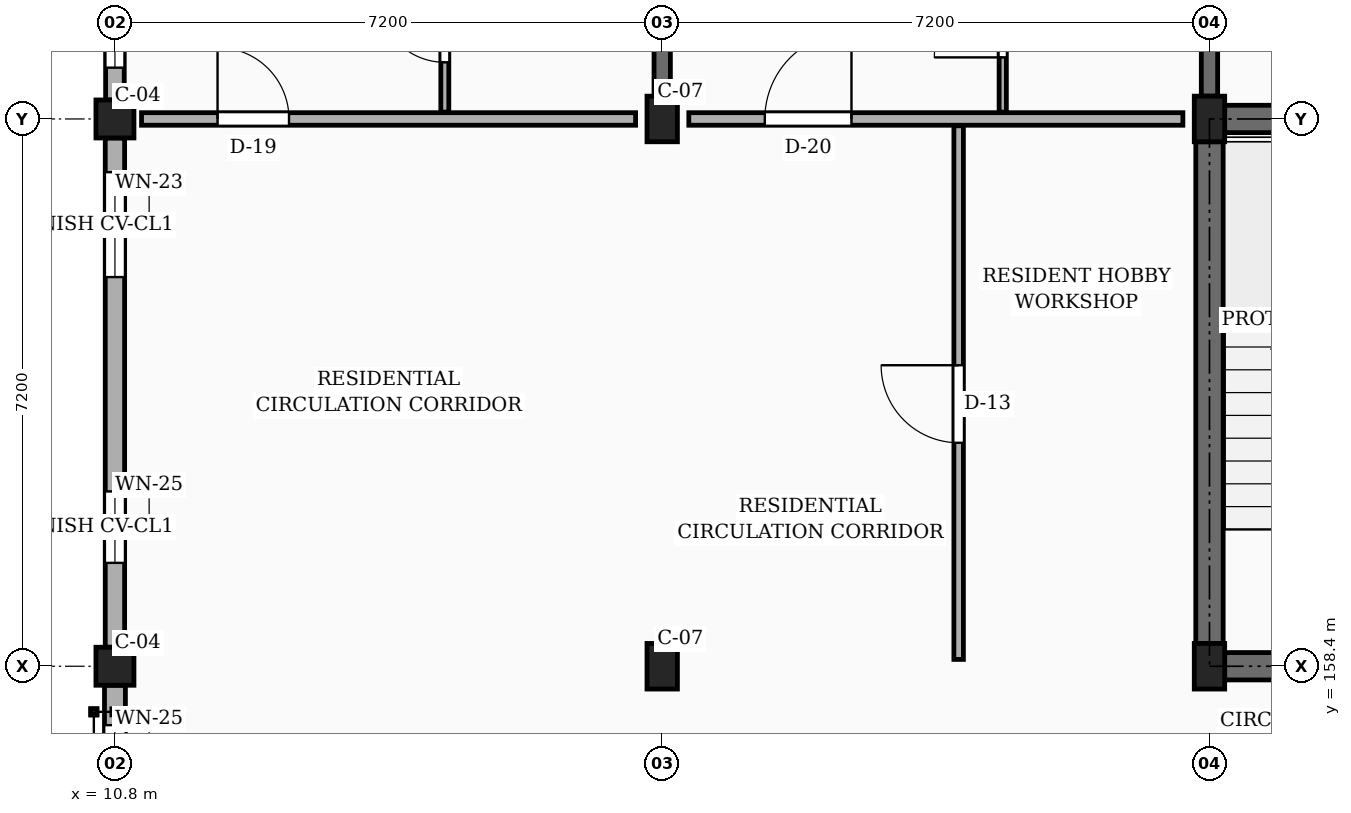
"""IFC4 building model, lengths in metres.
Left out: names, types, materials, properties, quantities, classifications, styles, units other than length and angle.
Written with IfcOpenShell. Run it as: python <this file> out.ifc"""

import sys

from ifc_helpers import new_model, si_unit, direction, frame, frame_2d, origin, origin_2d, place, context, subcontext, project, spatial, rectangle, extrude, element, fill, save


model = new_model("IFC4")
c1 = context("Model", 3, precision=1e-05, world=origin(), true_north=direction((0.0, 1.0)))
c2 = subcontext(c1, "Body", "Model", "MODEL_VIEW")
j1 = project(units=[si_unit("LENGTHUNIT", "METRE"), si_unit("PLANEANGLEUNIT", "RADIAN")], contexts=[c1])
p1 = place(None, origin())
s1 = spatial("IfcSite", under=j1, at=p1, CompositionType="ELEMENT")
p2 = place(p1, origin())
s2 = spatial("IfcBuilding", under=s1, at=p2, CompositionType="ELEMENT")
p3 = place(p2, frame((0.0, 0.0, 32.85)))
s3 = spatial("IfcBuildingStorey", under=s2, at=p3, CompositionType="ELEMENT", Elevation=32.85)
for number, where, z_axis, x_axis in (
    (1, (10.8, 158.4, 0.0), (0.0, 0.0, 1.0), (1.0, 0.0, 0.0)),
    (2, (10.8, 165.6, 0.0), (0.0, 0.0, 1.0), (1.0, 0.0, 0.0)),
):
    element("IfcColumn", number, at=place(p3, frame(where, z_axis=z_axis, x_axis=x_axis)), inside=s3, PredefinedType="COLUMN", context=c2, shape_type="SweptSolid", body=[
        extrude(rectangle(XDim=0.5, YDim=0.5, at=origin_2d()), origin(), (0.0, 0.0, 1.0), 3.15),
    ])
for number, where, z_axis, x_axis in (
    (3, (18.0, 158.4, 0.0), (0.0, 0.0, 1.0), (1.0, 0.0, 0.0)),
    (4, (18.0, 165.6, 0.0), (0.0, 0.0, 1.0), (1.0, 0.0, 0.0)),
    (5, (25.2, 158.4, 0.0), (0.0, 0.0, 1.0), (1.0, 0.0, 0.0)),
    (6, (25.2, 165.6, 0.0), (0.0, 0.0, 1.0), (1.0, 0.0, 0.0)),
):
    element("IfcColumn", number, at=place(p3, frame(where, z_axis=z_axis, x_axis=x_axis)), inside=s3, PredefinedType="COLUMN", context=c2, shape_type="SweptSolid", body=[
        extrude(rectangle(XDim=0.4, YDim=0.6, at=origin_2d()), origin(), (0.0, 0.0, 1.0), 3.15),
    ])
p4 = place(p3, frame((18.0, 165.9, 0.0), z_axis=(0.0, 0.0, 1.0), x_axis=(0.0, 1.0, 0.0)))
e7 = element("IfcWall", 7, at=p4, inside=s3, PredefinedType="SOLIDWALL", context=c2, shape_type="SweptSolid", body=[
    extrude(rectangle(XDim=6.65, YDim=0.215, at=frame_2d((3.325, 0.0))), origin(), (0.0, 0.0, 1.0), 2.185),
])
p5 = place(p3, frame((25.2, 165.9, 0.0), z_axis=(0.0, 0.0, 1.0), x_axis=(0.0, 1.0, 0.0)))
e8 = element("IfcWall", 8, at=p5, inside=s3, PredefinedType="SOLIDWALL", context=c2, shape_type="SweptSolid", body=[
    extrude(rectangle(XDim=6.65, YDim=0.215, at=frame_2d((3.325, 0.0))), origin(), (0.0, 0.0, 1.0), 2.185),
])
p6 = place(p5, frame((4.15, 0.0, 0.0)))
e9 = element("IfcOpeningElement", 9, at=p6, cuts=e8, PredefinedType="OPENING", context=c2, shape_type="SweptSolid", body=[
    extrude(rectangle(XDim=0.98, YDim=2.12, at=frame_2d((0.49, 1.06))), frame((0.0, 0.118, 0.0), z_axis=(0.0, -1.0, 0.0), x_axis=(1.0, 0.0, 0.0)), (0.0, 0.0, 1.0), 0.235),
])
p7 = place(p3, frame((10.8, 172.55, 0.0), z_axis=(0.0, 0.0, 1.0), x_axis=(0.0, -1.0, 0.0)))
e10 = element("IfcWall", 10, at=p7, inside=s3, PredefinedType="SOLIDWALL", context=c2, shape_type="SweptSolid", body=[
    extrude(rectangle(XDim=6.7, YDim=0.245, at=frame_2d((3.35, 0.0))), origin(), (0.0, 0.0, 1.0), 2.455),
])
p8 = place(p7, frame((1.765, 0.0, 0.78)))
e11 = element("IfcOpeningElement", 11, at=p8, cuts=e10, PredefinedType="OPENING", context=c2, shape_type="SweptSolid", body=[
    extrude(rectangle(XDim=1.22, YDim=1.36, at=frame_2d((0.61, 0.68))), frame((0.0, 0.133, 0.0), z_axis=(0.0, -1.0, 0.0), x_axis=(1.0, 0.0, 0.0)), (0.0, 0.0, 1.0), 0.265),
])
p9 = place(p7, frame((4.895, 0.0, 0.78)))
e12 = element("IfcOpeningElement", 12, at=p9, cuts=e10, PredefinedType="OPENING", context=c2, shape_type="SweptSolid", body=[
    extrude(rectangle(XDim=1.38, YDim=1.36, at=frame_2d((0.69, 0.68))), frame((0.0, 0.133, 0.0), z_axis=(0.0, -1.0, 0.0), x_axis=(1.0, 0.0, 0.0)), (0.0, 0.0, 1.0), 0.265),
])
p10 = place(p3, frame((10.8, 165.35, 0.0), z_axis=(0.0, 0.0, 1.0), x_axis=(0.0, -1.0, 0.0)))
e13 = element("IfcWall", 13, at=p10, inside=s3, PredefinedType="SOLIDWALL", context=c2, shape_type="SweptSolid", body=[
    extrude(rectangle(XDim=6.7, YDim=0.255, at=frame_2d((3.35, 0.0))), origin(), (0.0, 0.0, 1.0), 2.455),
])
p11 = place(p10, frame((0.45, 0.0, 0.78)))
e14 = element("IfcOpeningElement", 14, at=p11, cuts=e13, PredefinedType="OPENING", context=c2, shape_type="SweptSolid", body=[
    extrude(rectangle(XDim=1.38, YDim=1.36, at=frame_2d((0.69, 0.68))), frame((0.0, 0.137, 0.0), z_axis=(0.0, -1.0, 0.0), x_axis=(1.0, 0.0, 0.0)), (0.0, 0.0, 1.0), 0.275),
])
p12 = place(p10, frame((4.65, 0.0, 0.78)))
e15 = element("IfcOpeningElement", 15, at=p12, cuts=e13, PredefinedType="OPENING", context=c2, shape_type="SweptSolid", body=[
    extrude(rectangle(XDim=0.94, YDim=1.44, at=frame_2d((0.47, 0.72))), frame((0.0, 0.137, 0.0), z_axis=(0.0, -1.0, 0.0), x_axis=(1.0, 0.0, 0.0)), (0.0, 0.0, 1.0), 0.275),
])
p13 = place(p3, frame((10.8, 158.15, 0.0), z_axis=(0.0, 0.0, 1.0), x_axis=(0.0, -1.0, 0.0)))
e16 = element("IfcWall", 16, at=p13, inside=s3, PredefinedType="SOLIDWALL", context=c2, shape_type="SweptSolid", body=[
    extrude(rectangle(XDim=6.7, YDim=0.275, at=frame_2d((3.35, 0.0))), origin(), (0.0, 0.0, 1.0), 2.455),
])
p14 = place(p13, frame((0.525, 0.0, 0.78)))
e17 = element("IfcOpeningElement", 17, at=p14, cuts=e16, PredefinedType="OPENING", context=c2, shape_type="SweptSolid", body=[
    extrude(rectangle(XDim=0.94, YDim=1.44, at=frame_2d((0.47, 0.72))), frame((0.0, 0.147, 0.0), z_axis=(0.0, -1.0, 0.0), x_axis=(1.0, 0.0, 0.0)), (0.0, 0.0, 1.0), 0.295),
])
p15 = place(p13, frame((2.865, 0.0, 0.78)))
e18 = element("IfcOpeningElement", 18, at=p15, cuts=e16, PredefinedType="OPENING", context=c2, shape_type="SweptSolid", body=[
    extrude(rectangle(XDim=1.15, YDim=1.44, at=frame_2d((0.575, 0.72))), frame((0.0, 0.147, 0.0), z_axis=(0.0, -1.0, 0.0), x_axis=(1.0, 0.0, 0.0)), (0.0, 0.0, 1.0), 0.295),
])
p16 = place(p13, frame((5.355, 0.0, 0.78)))
e19 = element("IfcOpeningElement", 19, at=p16, cuts=e16, PredefinedType="OPENING", context=c2, shape_type="SweptSolid", body=[
    extrude(rectangle(XDim=0.88, YDim=1.26, at=frame_2d((0.44, 0.63))), frame((0.0, 0.147, 0.0), z_axis=(0.0, -1.0, 0.0), x_axis=(1.0, 0.0, 0.0)), (0.0, 0.0, 1.0), 0.295),
])
p17 = place(p3, frame((25.2, 158.7, 0.0), z_axis=(0.0, 0.0, 1.0), x_axis=(0.0, 1.0, 0.0)))
e20 = element("IfcWall", 20, at=p17, inside=s3, PredefinedType="SHEAR", context=c2, shape_type="SweptSolid", body=[
    extrude(rectangle(XDim=6.6, YDim=0.36, at=frame_2d((3.3, 0.0))), origin(), (0.0, 0.0, 1.0), 2.885),
])
p18 = place(p3, frame((25.4, 165.6, 0.0), z_axis=(0.0, 0.0, 1.0), x_axis=(1.0, 0.0, 0.0)))
e21 = element("IfcWall", 21, at=p18, inside=s3, PredefinedType="SHEAR", context=c2, shape_type="SweptSolid", body=[
    extrude(rectangle(XDim=6.8, YDim=0.36, at=frame_2d((3.4, 0.0))), origin(), (0.0, 0.0, 1.0), 2.885),
])
p19 = place(p3, frame((25.4, 158.4, 0.0), z_axis=(0.0, 0.0, 1.0), x_axis=(1.0, 0.0, 0.0)))
e22 = element("IfcWall", 22, at=p19, inside=s3, PredefinedType="SHEAR", context=c2, shape_type="SweptSolid", body=[
    extrude(rectangle(XDim=6.8, YDim=0.36, at=frame_2d((3.4, 0.0))), origin(), (0.0, 0.0, 1.0), 2.885),
])
p20 = place(p19, frame((4.55, 0.0, 0.0)))
e23 = element("IfcOpeningElement", 23, at=p20, cuts=e22, PredefinedType="OPENING", context=c2, shape_type="SweptSolid", body=[
    extrude(rectangle(XDim=1.1, YDim=2.15, at=frame_2d((0.55, 1.075))), frame((0.0, 0.19, 0.0), z_axis=(0.0, -1.0, 0.0), x_axis=(1.0, 0.0, 0.0)), (0.0, 0.0, 1.0), 0.38),
])
p21 = place(p3, frame((11.15, 165.6, 0.0), z_axis=(0.0, 0.0, 1.0), x_axis=(1.0, 0.0, 0.0)))
e24 = element("IfcWall", 24, at=p21, inside=s3, PredefinedType="PARTITIONING", context=c2, shape_type="SweptSolid", body=[
    extrude(rectangle(XDim=6.5, YDim=0.165, at=frame_2d((3.25, 0.0))), origin(), (0.0, 0.0, 1.0), 2.32),
])
p22 = place(p21, frame((1.0, 0.0, 0.0)))
e25 = element("IfcOpeningElement", 25, at=p22, cuts=e24, PredefinedType="OPENING", context=c2, shape_type="SweptSolid", body=[
    extrude(rectangle(XDim=0.94, YDim=2.12, at=frame_2d((0.47, 1.06))), frame((0.0, 0.093, 0.0), z_axis=(0.0, -1.0, 0.0), x_axis=(1.0, 0.0, 0.0)), (0.0, 0.0, 1.0), 0.185),
])
p23 = place(p3, frame((18.35, 165.6, 0.0), z_axis=(0.0, 0.0, 1.0), x_axis=(1.0, 0.0, 0.0)))
e26 = element("IfcWall", 26, at=p23, inside=s3, PredefinedType="PARTITIONING", context=c2, shape_type="SweptSolid", body=[
    extrude(rectangle(XDim=6.5, YDim=0.165, at=frame_2d((3.25, 0.0))), origin(), (0.0, 0.0, 1.0), 2.32),
])
p24 = place(p23, frame((1.0, 0.0, 0.0)))
e27 = element("IfcOpeningElement", 27, at=p24, cuts=e26, PredefinedType="OPENING", context=c2, shape_type="SweptSolid", body=[
    extrude(rectangle(XDim=1.14, YDim=2.18, at=frame_2d((0.57, 1.09))), frame((0.0, 0.093, 0.0), z_axis=(0.0, -1.0, 0.0), x_axis=(1.0, 0.0, 0.0)), (0.0, 0.0, 1.0), 0.185),
])
p25 = place(p3, frame((15.14, 165.69, 0.0), z_axis=(0.0, 0.0, 1.0), x_axis=(0.0, 1.0, 0.0)))
e28 = element("IfcWall", 28, at=p25, inside=s3, PredefinedType="PARTITIONING", context=c2, shape_type="SweptSolid", body=[
    extrude(rectangle(XDim=2.18, YDim=0.105, at=frame_2d((1.09, 0.0))), origin(), (0.0, 0.0, 1.0), 2.32),
])
p26 = place(p25, frame((0.655, 0.0, 0.0)))
e29 = element("IfcOpeningElement", 29, at=p26, cuts=e28, PredefinedType="OPENING", context=c2, shape_type="SweptSolid", body=[
    extrude(rectangle(XDim=0.87, YDim=2.05, at=frame_2d((0.435, 1.025))), frame((0.0, 0.062, 0.0), z_axis=(0.0, -1.0, 0.0), x_axis=(1.0, 0.0, 0.0)), (0.0, 0.0, 1.0), 0.125),
])
p27 = place(p3, frame((21.9, 158.49, 0.0), z_axis=(0.0, 0.0, 1.0), x_axis=(0.0, 1.0, 0.0)))
e30 = element("IfcWall", 30, at=p27, inside=s3, PredefinedType="PARTITIONING", context=c2, shape_type="SweptSolid", body=[
    extrude(rectangle(XDim=7.02, YDim=0.125, at=frame_2d((3.51, 0.0))), origin(), (0.0, 0.0, 1.0), 2.32),
])
p28 = place(p27, frame((2.85, 0.0, 0.0)))
e31 = element("IfcOpeningElement", 31, at=p28, cuts=e30, PredefinedType="OPENING", context=c2, shape_type="SweptSolid", body=[
    extrude(rectangle(XDim=1.02, YDim=2.15, at=frame_2d((0.51, 1.075))), frame((0.0, 0.073, 0.0), z_axis=(0.0, -1.0, 0.0), x_axis=(1.0, 0.0, 0.0)), (0.0, 0.0, 1.0), 0.145),
])
p29 = place(p3, frame((22.48, 165.69, 0.0), z_axis=(0.0, 0.0, 1.0), x_axis=(0.0, 1.0, 0.0)))
e32 = element("IfcWall", 32, at=p29, inside=s3, PredefinedType="PARTITIONING", context=c2, shape_type="SweptSolid", body=[
    extrude(rectangle(XDim=2.34, YDim=0.095, at=frame_2d((1.17, 0.0))), origin(), (0.0, 0.0, 1.0), 2.32),
])
p30 = place(p29, frame((0.72, 0.0, 0.0)))
e33 = element("IfcOpeningElement", 33, at=p30, cuts=e32, PredefinedType="OPENING", context=c2, shape_type="SweptSolid", body=[
    extrude(rectangle(XDim=0.9, YDim=2.05, at=frame_2d((0.45, 1.025))), frame((0.0, 0.058, 0.0), z_axis=(0.0, -1.0, 0.0), x_axis=(1.0, 0.0, 0.0)), (0.0, 0.0, 1.0), 0.115),
])
p31 = place(p9, origin())
e34 = element("IfcWindow", 34, at=p31, inside=s3, PartitioningType="SINGLE_PANEL", PredefinedType="WINDOW", context=c2, shape_type="SweptSolid", body=[
    extrude(rectangle(XDim=1.38, YDim=1.36, at=frame_2d((0.69, 0.68))), frame((0.0, 0.03, 0.0), z_axis=(0.0, -1.0, 0.0), x_axis=(1.0, 0.0, 0.0)), (0.0, 0.0, 1.0), 0.06),
])
fill(e12, e34)
p32 = place(p11, origin())
e35 = element("IfcWindow", 35, at=p32, inside=s3, PartitioningType="SINGLE_PANEL", PredefinedType="WINDOW", context=c2, shape_type="SweptSolid", body=[
    extrude(rectangle(XDim=1.38, YDim=1.36, at=frame_2d((0.69, 0.68))), frame((0.0, 0.03, 0.0), z_axis=(0.0, -1.0, 0.0), x_axis=(1.0, 0.0, 0.0)), (0.0, 0.0, 1.0), 0.06),
])
fill(e14, e35)
p33 = place(p12, origin())
e36 = element("IfcWindow", 36, at=p33, inside=s3, PartitioningType="SINGLE_PANEL", PredefinedType="WINDOW", context=c2, shape_type="SweptSolid", body=[
    extrude(rectangle(XDim=0.94, YDim=1.44, at=frame_2d((0.47, 0.72))), frame((0.0, 0.03, 0.0), z_axis=(0.0, -1.0, 0.0), x_axis=(1.0, 0.0, 0.0)), (0.0, 0.0, 1.0), 0.06),
])
fill(e15, e36)
p34 = place(p14, origin())
e37 = element("IfcWindow", 37, at=p34, inside=s3, PartitioningType="SINGLE_PANEL", PredefinedType="WINDOW", context=c2, shape_type="SweptSolid", body=[
    extrude(rectangle(XDim=0.94, YDim=1.44, at=frame_2d((0.47, 0.72))), frame((0.0, 0.03, 0.0), z_axis=(0.0, -1.0, 0.0), x_axis=(1.0, 0.0, 0.0)), (0.0, 0.0, 1.0), 0.06),
])
fill(e17, e37)
p35 = place(p22, origin())
e38 = element("IfcDoor", 38, at=p35, inside=s3, OperationType="SINGLE_SWING_LEFT", PredefinedType="DOOR", context=c2, shape_type="SweptSolid", body=[
    extrude(rectangle(XDim=0.94, YDim=2.12, at=frame_2d((0.47, 1.06))), frame((0.0, 0.025, 0.0), z_axis=(0.0, -1.0, 0.0), x_axis=(1.0, 0.0, 0.0)), (0.0, 0.0, 1.0), 0.05),
])
fill(e25, e38)
p36 = place(p24, origin())
e39 = element("IfcDoor", 39, at=p36, inside=s3, OperationType="SINGLE_SWING_RIGHT", PredefinedType="DOOR", context=c2, shape_type="SweptSolid", body=[
    extrude(rectangle(XDim=1.14, YDim=2.18, at=frame_2d((0.57, 1.09))), frame((0.0, 0.025, 0.0), z_axis=(0.0, -1.0, 0.0), x_axis=(1.0, 0.0, 0.0)), (0.0, 0.0, 1.0), 0.05),
])
fill(e27, e39)
p37 = place(p26, origin())
e40 = element("IfcDoor", 40, at=p37, inside=s3, OperationType="SINGLE_SWING_RIGHT", PredefinedType="DOOR", context=c2, shape_type="SweptSolid", body=[
    extrude(rectangle(XDim=0.87, YDim=2.05, at=frame_2d((0.435, 1.025))), frame((0.0, 0.025, 0.0), z_axis=(0.0, -1.0, 0.0), x_axis=(1.0, 0.0, 0.0)), (0.0, 0.0, 1.0), 0.05),
])
fill(e29, e40)
p38 = place(p28, origin())
e41 = element("IfcDoor", 41, at=p38, inside=s3, OperationType="SINGLE_SWING_RIGHT", PredefinedType="DOOR", context=c2, shape_type="SweptSolid", body=[
    extrude(rectangle(XDim=1.02, YDim=2.15, at=frame_2d((0.51, 1.075))), frame((0.0, 0.025, 0.0), z_axis=(0.0, -1.0, 0.0), x_axis=(1.0, 0.0, 0.0)), (0.0, 0.0, 1.0), 0.05),
])
fill(e31, e41)
p39 = place(p30, origin())
e42 = element("IfcDoor", 42, at=p39, inside=s3, OperationType="SINGLE_SWING_LEFT", PredefinedType="DOOR", context=c2, shape_type="SweptSolid", body=[
    extrude(rectangle(XDim=0.9, YDim=2.05, at=frame_2d((0.45, 1.025))), frame((0.0, 0.025, 0.0), z_axis=(0.0, -1.0, 0.0), x_axis=(1.0, 0.0, 0.0)), (0.0, 0.0, 1.0), 0.05),
])
fill(e33, e42)
save(model, sys.argv[1])
